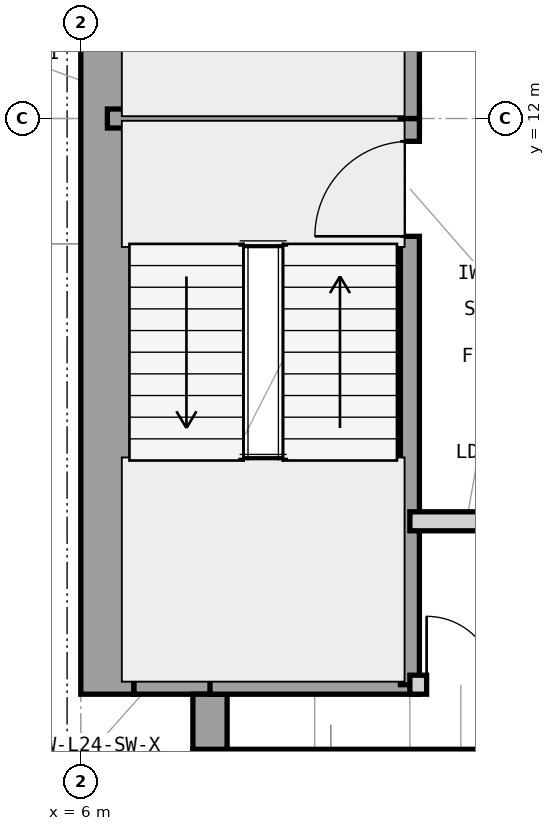
"""IFC4 building model, lengths in metres.
Left out: names, types, materials, properties, quantities, classifications, styles, units other than length and angle.
Written with IfcOpenShell. Run it as: python <this file> out.ifc"""

import sys

from ifc_helpers import new_model, si_unit, direction, frame, frame_2d, origin, place, context, subcontext, project, spatial, rectangle, extrude, element, fill, save


model = new_model("IFC4")
c1 = context("Model", 3, precision=1e-05, world=origin(), true_north=direction((0.0, 1.0)))
c2 = subcontext(c1, "Body", "Model", "MODEL_VIEW")
j1 = project(units=[si_unit("LENGTHUNIT", "METRE"), si_unit("PLANEANGLEUNIT", "RADIAN")], contexts=[c1])
p1 = place(None, origin())
s1 = spatial("IfcSite", under=j1, at=p1, CompositionType="ELEMENT")
p2 = place(p1, origin())
s2 = spatial("IfcBuilding", under=s1, at=p2, CompositionType="ELEMENT")
p3 = place(p2, frame((0.0, 0.0, 105.0)))
s3 = spatial("IfcBuildingStorey", under=s2, at=p3, CompositionType="ELEMENT", Elevation=105.0)
p4 = place(p3, frame((7.475, 3.35, 0.0), z_axis=(0.0, 0.0, 1.0), x_axis=(1.0, 0.0, 0.0)))
e1 = element("IfcWall", 1, at=p4, inside=s3, PredefinedType="SHEAR", context=c2, shape_type="SweptSolid", body=[
    extrude(rectangle(XDim=16.525, YDim=0.7, at=frame_2d((8.262, 0.0))), origin(), (0.0, 0.0, 1.0), 3.9),
])
p5 = place(p3, frame((6.35, 4.425, 0.0), z_axis=(0.0, 0.0, 1.0), x_axis=(0.0, 1.0, 0.0)))
e2 = element("IfcWall", 2, at=p5, inside=s3, PredefinedType="SHEAR", context=c2, shape_type="SweptSolid", body=[
    extrude(rectangle(XDim=15.15, YDim=0.7, at=frame_2d((7.575, 0.0))), origin(), (0.0, 0.0, 1.0), 3.9),
])
p6 = place(p3, frame((6.7, 4.65, 0.0), z_axis=(0.0, 0.0, 1.0), x_axis=(1.0, 0.0, 0.0)))
e3 = element("IfcWall", 3, at=p6, inside=s3, PredefinedType="SHEAR", context=c2, shape_type="SweptSolid", body=[
    extrude(rectangle(XDim=1.225, YDim=0.45, at=frame_2d((0.613, 0.0))), origin(), (0.0, 0.0, 1.0), 3.9),
])
p7 = place(p3, frame((7.7, 3.7, 0.0), z_axis=(0.0, 0.0, 1.0), x_axis=(0.0, 1.0, 0.0)))
e4 = element("IfcWall", 4, at=p7, inside=s3, PredefinedType="SHEAR", context=c2, shape_type="SweptSolid", body=[
    extrude(rectangle(XDim=0.725, YDim=0.45, at=frame_2d((0.363, 0.0))), origin(), (0.0, 0.0, 1.0), 3.9),
])
p8 = place(p3, frame((6.35, 12.0, 0.0), z_axis=(0.0, 0.0, 1.0), x_axis=(1.0, 0.0, 0.0)))
e5 = element("IfcWall", 5, at=p8, inside=s3, PredefinedType="SHEAR", context=c2, shape_type="SweptSolid", body=[
    extrude(rectangle(XDim=4.105, YDim=0.25, at=frame_2d((2.052, 0.0))), origin(), (0.0, 0.0, 1.0), 3.9),
])
p9 = place(p3, frame((7.7, 4.55, 0.0), z_axis=(0.0, 0.0, 1.0), x_axis=(1.0, 0.0, 0.0)))
e6 = element("IfcWall", 6, at=p9, inside=s3, PredefinedType="SHEAR", context=c2, shape_type="SweptSolid", body=[
    extrude(rectangle(XDim=2.755, YDim=0.25, at=frame_2d((1.377, 0.0))), origin(), (0.0, 0.0, 1.0), 3.9),
])
p10 = place(p3, frame((10.33, 4.55, 0.0), z_axis=(0.0, 0.0, 1.0), x_axis=(0.0, 1.0, 0.0)))
e7 = element("IfcWall", 7, at=p10, inside=s3, PredefinedType="SHEAR", context=c2, shape_type="SweptSolid", body=[
    extrude(rectangle(XDim=7.45, YDim=0.25, at=frame_2d((3.725, 0.0))), origin(), (0.0, 0.0, 1.0), 3.9),
])
p11 = place(p10, frame((5.9, 0.0, 0.0)))
e8 = element("IfcOpeningElement", 8, at=p11, cuts=e7, PredefinedType="OPENING", context=c2, shape_type="SweptSolid", body=[
    extrude(rectangle(XDim=1.25, YDim=2.2, at=frame_2d((0.625, 1.1))), frame((0.0, 0.135, 0.0), z_axis=(0.0, -1.0, 0.0), x_axis=(1.0, 0.0, 0.0)), (0.0, 0.0, 1.0), 0.27),
])
p12 = place(p3, frame((10.33, 12.0, 0.0), z_axis=(0.0, 0.0, 1.0), x_axis=(0.0, 1.0, 0.0)))
e9 = element("IfcWall", 9, at=p12, inside=s3, PredefinedType="SHEAR", context=c2, shape_type="SweptSolid", body=[
    extrude(rectangle(XDim=7.45, YDim=0.25, at=frame_2d((3.725, 0.0))), origin(), (0.0, 0.0, 1.0), 3.9),
])
p13 = place(p12, frame((5.85, 0.0, 0.0)))
e10 = element("IfcOpeningElement", 10, at=p13, cuts=e9, PredefinedType="OPENING", context=c2, shape_type="SweptSolid", body=[
    extrude(rectangle(XDim=1.25, YDim=2.2, at=frame_2d((0.625, 1.1))), frame((0.0, 0.135, 0.0), z_axis=(0.0, -1.0, 0.0), x_axis=(1.0, 0.0, 0.0)), (0.0, 0.0, 1.0), 0.27),
])
p14 = place(p3, frame((10.33, 4.55, 0.0), z_axis=(0.0, 0.0, 1.0), x_axis=(1.0, 0.0, 0.0)))
e11 = element("IfcWall", 11, at=p14, inside=s3, PredefinedType="PARTITIONING", context=c2, shape_type="SweptSolid", body=[
    extrude(rectangle(XDim=1.49, YDim=0.25, at=frame_2d((0.745, 0.0))), origin(), (0.0, 0.0, 1.0), 3.69),
])
p15 = place(p14, frame((0.22, 0.0, 0.0)))
e12 = element("IfcOpeningElement", 12, at=p15, cuts=e11, PredefinedType="OPENING", context=c2, shape_type="SweptSolid", body=[
    extrude(rectangle(XDim=0.9, YDim=2.1, at=frame_2d((0.45, 1.05))), frame((0.0, 0.135, 0.0), z_axis=(0.0, -1.0, 0.0), x_axis=(1.0, 0.0, 0.0)), (0.0, 0.0, 1.0), 0.27),
])
p16 = place(p3, frame((10.33, 6.7, 0.0), z_axis=(0.0, 0.0, 1.0), x_axis=(1.0, 0.0, 0.0)))
e13 = element("IfcWall", 13, at=p16, inside=s3, PredefinedType="PARTITIONING", context=c2, shape_type="SweptSolid", body=[
    extrude(rectangle(XDim=1.49, YDim=0.25, at=frame_2d((0.745, 0.0))), origin(), (0.0, 0.0, 1.0), 3.227),
])
p17 = place(p11, origin())
e14 = element("IfcDoor", 14, at=p17, inside=s3, OperationType="SINGLE_SWING_LEFT", PredefinedType="DOOR", context=c2, shape_type="SweptSolid", body=[
    extrude(rectangle(XDim=1.25, YDim=2.2, at=frame_2d((0.625, 1.1))), frame((0.0, 0.025, 0.0), z_axis=(0.0, -1.0, 0.0), x_axis=(1.0, 0.0, 0.0)), (0.0, 0.0, 1.0), 0.05),
])
fill(e8, e14)
p18 = place(p15, origin())
e15 = element("IfcDoor", 15, at=p18, inside=s3, OperationType="SINGLE_SWING_LEFT", PredefinedType="TRAPDOOR", context=c2, shape_type="SweptSolid", body=[
    extrude(rectangle(XDim=0.9, YDim=2.1, at=frame_2d((0.45, 1.05))), frame((0.0, 0.025, 0.0), z_axis=(0.0, -1.0, 0.0), x_axis=(1.0, 0.0, 0.0)), (0.0, 0.0, 1.0), 0.05),
])
fill(e12, e15)
save(model, sys.argv[1])
